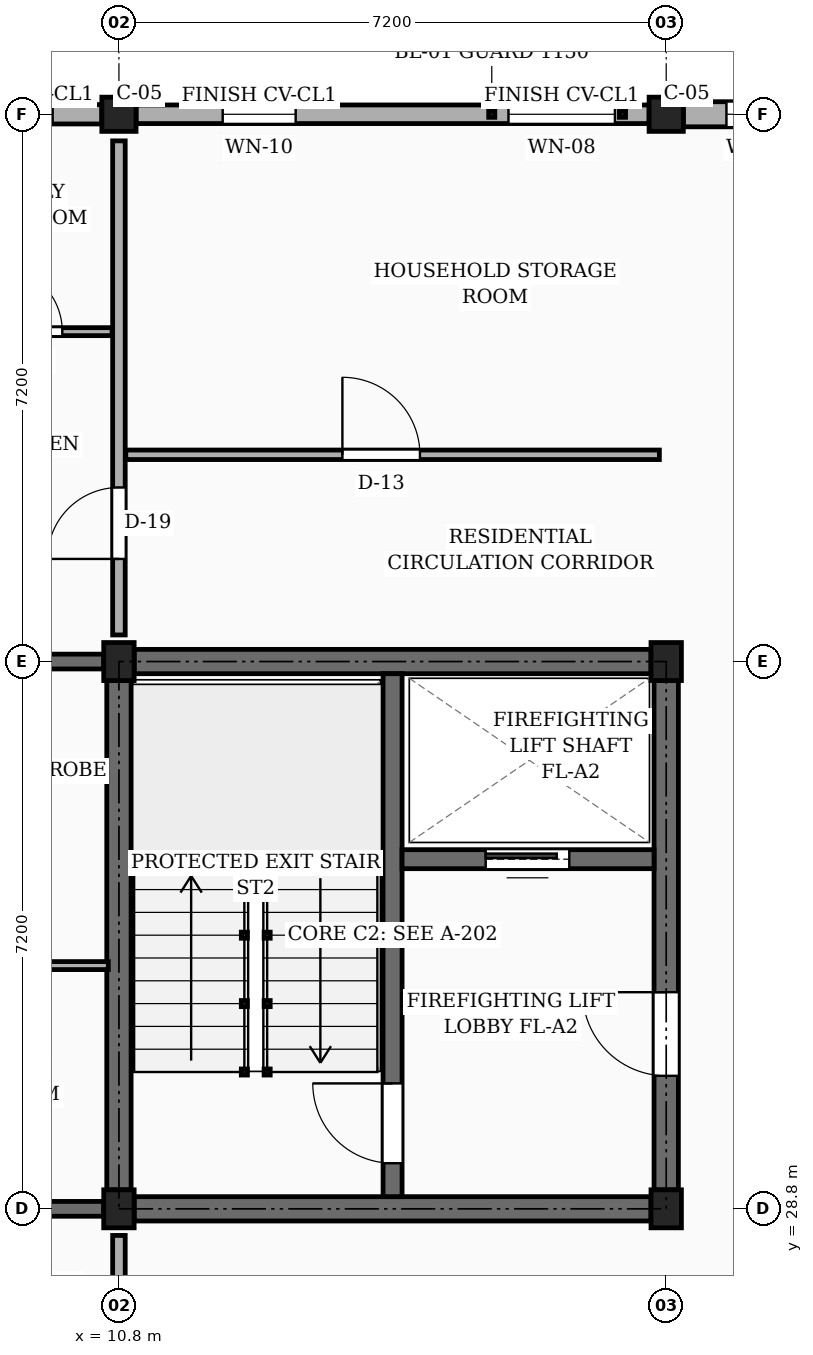
"""IFC4 building model, lengths in metres.
Left out: names, types, materials, properties, quantities, classifications, styles, units other than length and angle.
Written with IfcOpenShell. Run it as: python <this file> out.ifc"""

import sys

from ifc_helpers import new_model, si_unit, direction, frame, frame_2d, origin, origin_2d, place, context, subcontext, project, spatial, rectangle, extrude, element, fill, save


model = new_model("IFC4")
c1 = context("Model", 3, precision=1e-05, world=origin(), true_north=direction((0.0, 1.0)))
c2 = subcontext(c1, "Body", "Model", "MODEL_VIEW")
j1 = project(units=[si_unit("LENGTHUNIT", "METRE"), si_unit("PLANEANGLEUNIT", "RADIAN")], contexts=[c1])
p1 = place(None, origin())
s1 = spatial("IfcSite", under=j1, at=p1, CompositionType="ELEMENT")
p2 = place(p1, origin())
s2 = spatial("IfcBuilding", under=s1, at=p2, CompositionType="ELEMENT")
p3 = place(p2, frame((0.0, 0.0, 39.15)))
s3 = spatial("IfcBuildingStorey", under=s2, at=p3, CompositionType="ELEMENT", Elevation=39.15)
for number, where, z_axis, x_axis in (
    (1, (10.8, 28.8, 0.0), (0.0, 0.0, 1.0), (1.0, 0.0, 0.0)),
    (2, (10.8, 36.0, 0.0), (0.0, 0.0, 1.0), (1.0, 0.0, 0.0)),
):
    element("IfcColumn", number, at=place(p3, frame(where, z_axis=z_axis, x_axis=x_axis)), inside=s3, PredefinedType="COLUMN", context=c2, shape_type="SweptSolid", body=[
        extrude(rectangle(XDim=0.4, YDim=0.5, at=origin_2d()), origin(), (0.0, 0.0, 1.0), 3.15),
    ])
p4 = place(p3, frame((10.8, 43.2, 0.0), z_axis=(0.0, 0.0, 1.0), x_axis=(1.0, 0.0, 0.0)))
e3 = element("IfcColumn", 3, at=p4, inside=s3, PredefinedType="COLUMN", context=c2, shape_type="SweptSolid", body=[
    extrude(rectangle(XDim=0.45, YDim=0.45, at=origin_2d()), origin(), (0.0, 0.0, 1.0), 3.15),
])
for number, where, z_axis, x_axis in (
    (4, (18.0, 28.8, 0.0), (0.0, 0.0, 1.0), (1.0, 0.0, 0.0)),
    (5, (18.0, 36.0, 0.0), (0.0, 0.0, 1.0), (1.0, 0.0, 0.0)),
):
    element("IfcColumn", number, at=place(p3, frame(where, z_axis=z_axis, x_axis=x_axis)), inside=s3, PredefinedType="COLUMN", context=c2, shape_type="SweptSolid", body=[
        extrude(rectangle(XDim=0.4, YDim=0.5, at=origin_2d()), origin(), (0.0, 0.0, 1.0), 3.15),
    ])
p5 = place(p3, frame((18.0, 43.2, 0.0), z_axis=(0.0, 0.0, 1.0), x_axis=(1.0, 0.0, 0.0)))
e6 = element("IfcColumn", 6, at=p5, inside=s3, PredefinedType="COLUMN", context=c2, shape_type="SweptSolid", body=[
    extrude(rectangle(XDim=0.45, YDim=0.45, at=origin_2d()), origin(), (0.0, 0.0, 1.0), 3.15),
])
p6 = place(p3, frame((3.825, 28.8, 0.0), z_axis=(0.0, 0.0, 1.0), x_axis=(1.0, 0.0, 0.0)))
e7 = element("IfcWall", 7, at=p6, inside=s3, PredefinedType="SOLIDWALL", context=c2, shape_type="SweptSolid", body=[
    extrude(rectangle(XDim=6.775, YDim=0.195, at=frame_2d((3.388, 0.0))), origin(), (0.0, 0.0, 1.0), 2.17),
])
p7 = place(p6, frame((1.35, 0.0, 0.0)))
e8 = element("IfcOpeningElement", 8, at=p7, cuts=e7, PredefinedType="OPENING", context=c2, shape_type="SweptSolid", body=[
    extrude(rectangle(XDim=0.98, YDim=2.12, at=frame_2d((0.49, 1.06))), frame((0.0, 0.107, 0.0), z_axis=(0.0, -1.0, 0.0), x_axis=(1.0, 0.0, 0.0)), (0.0, 0.0, 1.0), 0.215),
])
p8 = place(p3, frame((3.825, 36.0, 0.0), z_axis=(0.0, 0.0, 1.0), x_axis=(1.0, 0.0, 0.0)))
e9 = element("IfcWall", 9, at=p8, inside=s3, PredefinedType="SOLIDWALL", context=c2, shape_type="SweptSolid", body=[
    extrude(rectangle(XDim=6.775, YDim=0.195, at=frame_2d((3.388, 0.0))), origin(), (0.0, 0.0, 1.0), 2.17),
])
p9 = place(p3, frame((24.975, 43.2, 0.0), z_axis=(0.0, 0.0, 1.0), x_axis=(-1.0, 0.0, 0.0)))
e10 = element("IfcWall", 10, at=p9, inside=s3, PredefinedType="SOLIDWALL", context=c2, shape_type="SweptSolid", body=[
    extrude(rectangle(XDim=6.75, YDim=0.33, at=frame_2d((3.375, 0.0))), origin(), (0.0, 0.0, 1.0), 2.44),
])
p10 = place(p9, frame((0.917, 0.0, 0.78)))
e11 = element("IfcOpeningElement", 11, at=p10, cuts=e10, PredefinedType="OPENING", context=c2, shape_type="SweptSolid", body=[
    extrude(rectangle(XDim=1.16, YDim=1.15, at=frame_2d((0.58, 0.575))), frame((0.0, 0.175, 0.0), z_axis=(0.0, -1.0, 0.0), x_axis=(1.0, 0.0, 0.0)), (0.0, 0.0, 1.0), 0.35),
])
p11 = place(p9, frame((3.205, 0.0, 0.78)))
e12 = element("IfcOpeningElement", 12, at=p11, cuts=e10, PredefinedType="OPENING", context=c2, shape_type="SweptSolid", body=[
    extrude(rectangle(XDim=1.32, YDim=1.15, at=frame_2d((0.66, 0.575))), frame((0.0, 0.175, 0.0), z_axis=(0.0, -1.0, 0.0), x_axis=(1.0, 0.0, 0.0)), (0.0, 0.0, 1.0), 0.35),
])
p12 = place(p9, frame((5.302, 0.0, 0.78)))
e13 = element("IfcOpeningElement", 13, at=p12, cuts=e10, PredefinedType="OPENING", context=c2, shape_type="SweptSolid", body=[
    extrude(rectangle(XDim=0.88, YDim=1.26, at=frame_2d((0.44, 0.63))), frame((0.0, 0.175, 0.0), z_axis=(0.0, -1.0, 0.0), x_axis=(1.0, 0.0, 0.0)), (0.0, 0.0, 1.0), 0.35),
])
p13 = place(p3, frame((17.775, 43.2, 0.0), z_axis=(0.0, 0.0, 1.0), x_axis=(-1.0, 0.0, 0.0)))
e14 = element("IfcWall", 14, at=p13, inside=s3, PredefinedType="SOLIDWALL", context=c2, shape_type="SweptSolid", body=[
    extrude(rectangle(XDim=6.75, YDim=0.245, at=frame_2d((3.375, 0.0))), origin(), (0.0, 0.0, 1.0), 2.44),
])
p14 = place(p13, frame((0.45, 0.0, 0.78)))
e15 = element("IfcOpeningElement", 15, at=p14, cuts=e14, PredefinedType="OPENING", context=c2, shape_type="SweptSolid", body=[
    extrude(rectangle(XDim=1.4, YDim=1.15, at=frame_2d((0.7, 0.575))), frame((0.0, 0.133, 0.0), z_axis=(0.0, -1.0, 0.0), x_axis=(1.0, 0.0, 0.0)), (0.0, 0.0, 1.0), 0.265),
])
p15 = place(p13, frame((4.65, 0.0, 0.78)))
e16 = element("IfcOpeningElement", 16, at=p15, cuts=e14, PredefinedType="OPENING", context=c2, shape_type="SweptSolid", body=[
    extrude(rectangle(XDim=0.96, YDim=1.26, at=frame_2d((0.48, 0.63))), frame((0.0, 0.133, 0.0), z_axis=(0.0, -1.0, 0.0), x_axis=(1.0, 0.0, 0.0)), (0.0, 0.0, 1.0), 0.265),
])
p16 = place(p3, frame((10.575, 43.2, 0.0), z_axis=(0.0, 0.0, 1.0), x_axis=(-1.0, 0.0, 0.0)))
e17 = element("IfcWall", 17, at=p16, inside=s3, PredefinedType="SOLIDWALL", context=c2, shape_type="SweptSolid", body=[
    extrude(rectangle(XDim=6.75, YDim=0.255, at=frame_2d((3.375, 0.0))), origin(), (0.0, 0.0, 1.0), 2.44),
])
p17 = place(p16, frame((0.647, 0.0, 0.78)))
e18 = element("IfcOpeningElement", 18, at=p17, cuts=e17, PredefinedType="OPENING", context=c2, shape_type="SweptSolid", body=[
    extrude(rectangle(XDim=0.96, YDim=1.26, at=frame_2d((0.48, 0.63))), frame((0.0, 0.137, 0.0), z_axis=(0.0, -1.0, 0.0), x_axis=(1.0, 0.0, 0.0)), (0.0, 0.0, 1.0), 0.275),
])
p18 = place(p16, frame((3.802, 0.0, 0.78)))
e19 = element("IfcOpeningElement", 19, at=p18, cuts=e17, PredefinedType="OPENING", context=c2, shape_type="SweptSolid", body=[
    extrude(rectangle(XDim=1.12, YDim=1.26, at=frame_2d((0.56, 0.63))), frame((0.0, 0.137, 0.0), z_axis=(0.0, -1.0, 0.0), x_axis=(1.0, 0.0, 0.0)), (0.0, 0.0, 1.0), 0.275),
])
p19 = place(p3, frame((10.8, 29.05, 0.0), z_axis=(0.0, 0.0, 1.0), x_axis=(0.0, 1.0, 0.0)))
e20 = element("IfcWall", 20, at=p19, inside=s3, PredefinedType="SHEAR", context=c2, shape_type="SweptSolid", body=[
    extrude(rectangle(XDim=6.7, YDim=0.32, at=frame_2d((3.35, 0.0))), origin(), (0.0, 0.0, 1.0), 2.87),
])
p20 = place(p3, frame((11.0, 36.0, 0.0), z_axis=(0.0, 0.0, 1.0), x_axis=(1.0, 0.0, 0.0)))
e21 = element("IfcWall", 21, at=p20, inside=s3, PredefinedType="SHEAR", context=c2, shape_type="SweptSolid", body=[
    extrude(rectangle(XDim=6.8, YDim=0.32, at=frame_2d((3.4, 0.0))), origin(), (0.0, 0.0, 1.0), 2.87),
])
p21 = place(p3, frame((18.0, 29.05, 0.0), z_axis=(0.0, 0.0, 1.0), x_axis=(0.0, 1.0, 0.0)))
e22 = element("IfcWall", 22, at=p21, inside=s3, PredefinedType="SHEAR", context=c2, shape_type="SweptSolid", body=[
    extrude(rectangle(XDim=6.7, YDim=0.32, at=frame_2d((3.35, 0.0))), origin(), (0.0, 0.0, 1.0), 2.87),
])
p22 = place(p21, frame((1.5, 0.0, 0.0)))
e23 = element("IfcOpeningElement", 23, at=p22, cuts=e22, PredefinedType="OPENING", context=c2, shape_type="SweptSolid", body=[
    extrude(rectangle(XDim=1.1, YDim=2.15, at=frame_2d((0.55, 1.075))), frame((0.0, 0.17, 0.0), z_axis=(0.0, -1.0, 0.0), x_axis=(1.0, 0.0, 0.0)), (0.0, 0.0, 1.0), 0.34),
])
p23 = place(p3, frame((11.0, 28.8, 0.0), z_axis=(0.0, 0.0, 1.0), x_axis=(1.0, 0.0, 0.0)))
e24 = element("IfcWall", 24, at=p23, inside=s3, PredefinedType="SHEAR", context=c2, shape_type="SweptSolid", body=[
    extrude(rectangle(XDim=6.8, YDim=0.32, at=frame_2d((3.4, 0.0))), origin(), (0.0, 0.0, 1.0), 2.87),
])
p24 = place(p3, frame((14.4, 28.96, 0.0), z_axis=(0.0, 0.0, 1.0), x_axis=(0.0, 1.0, 0.0)))
e25 = element("IfcWall", 25, at=p24, inside=s3, PredefinedType="SHEAR", context=c2, shape_type="SweptSolid", body=[
    extrude(rectangle(XDim=6.88, YDim=0.25, at=frame_2d((3.44, 0.0))), origin(), (0.0, 0.0, 1.0), 2.87),
])
p25 = place(p24, frame((0.44, 0.0, 0.0)))
e26 = element("IfcOpeningElement", 26, at=p25, cuts=e25, PredefinedType="OPENING", context=c2, shape_type="SweptSolid", body=[
    extrude(rectangle(XDim=1.05, YDim=2.15, at=frame_2d((0.525, 1.075))), frame((0.0, 0.135, 0.0), z_axis=(0.0, -1.0, 0.0), x_axis=(1.0, 0.0, 0.0)), (0.0, 0.0, 1.0), 0.27),
])
p26 = place(p3, frame((14.525, 33.4, 0.0), z_axis=(0.0, 0.0, 1.0), x_axis=(1.0, 0.0, 0.0)))
e27 = element("IfcWall", 27, at=p26, inside=s3, PredefinedType="SHEAR", context=c2, shape_type="SweptSolid", body=[
    extrude(rectangle(XDim=3.315, YDim=0.25, at=frame_2d((1.658, 0.0))), origin(), (0.0, 0.0, 1.0), 2.87),
])
p27 = place(p26, frame((1.1, 0.0, 0.0)))
e28 = element("IfcOpeningElement", 28, at=p27, cuts=e27, PredefinedType="OPENING", context=c2, shape_type="SweptSolid", body=[
    extrude(rectangle(XDim=1.1, YDim=2.2, at=frame_2d((0.55, 1.1))), frame((0.0, 0.135, 0.0), z_axis=(0.0, -1.0, 0.0), x_axis=(1.0, 0.0, 0.0)), (0.0, 0.0, 1.0), 0.27),
])
p28 = place(p3, frame((10.8, 21.95, 0.0), z_axis=(0.0, 0.0, 1.0), x_axis=(0.0, 1.0, 0.0)))
e29 = element("IfcWall", 29, at=p28, inside=s3, PredefinedType="PARTITIONING", context=c2, shape_type="SweptSolid", body=[
    extrude(rectangle(XDim=6.5, YDim=0.165, at=frame_2d((3.25, 0.0))), origin(), (0.0, 0.0, 1.0), 2.305),
])
p29 = place(p28, frame((1.0, 0.0, 0.0)))
e30 = element("IfcOpeningElement", 30, at=p29, cuts=e29, PredefinedType="OPENING", context=c2, shape_type="SweptSolid", body=[
    extrude(rectangle(XDim=1.0, YDim=2.15, at=frame_2d((0.5, 1.075))), frame((0.0, 0.093, 0.0), z_axis=(0.0, -1.0, 0.0), x_axis=(1.0, 0.0, 0.0)), (0.0, 0.0, 1.0), 0.185),
])
p30 = place(p3, frame((10.8, 36.35, 0.0), z_axis=(0.0, 0.0, 1.0), x_axis=(0.0, 1.0, 0.0)))
e31 = element("IfcWall", 31, at=p30, inside=s3, PredefinedType="PARTITIONING", context=c2, shape_type="SweptSolid", body=[
    extrude(rectangle(XDim=6.5, YDim=0.165, at=frame_2d((3.25, 0.0))), origin(), (0.0, 0.0, 1.0), 2.305),
])
p31 = place(p30, frame((1.0, 0.0, 0.0)))
e32 = element("IfcOpeningElement", 32, at=p31, cuts=e31, PredefinedType="OPENING", context=c2, shape_type="SweptSolid", body=[
    extrude(rectangle(XDim=0.94, YDim=2.12, at=frame_2d((0.47, 1.06))), frame((0.0, 0.093, 0.0), z_axis=(0.0, -1.0, 0.0), x_axis=(1.0, 0.0, 0.0)), (0.0, 0.0, 1.0), 0.185),
])
p32 = place(p3, frame((7.27, 32.0, 0.0), z_axis=(0.0, 0.0, 1.0), x_axis=(1.0, 0.0, 0.0)))
e33 = element("IfcWall", 33, at=p32, inside=s3, PredefinedType="PARTITIONING", context=c2, shape_type="SweptSolid", body=[
    extrude(rectangle(XDim=3.39, YDim=0.105, at=frame_2d((1.695, 0.0))), origin(), (0.0, 0.0, 1.0), 2.305),
])
p33 = place(p3, frame((10.89, 38.72, 0.0), z_axis=(0.0, 0.0, 1.0), x_axis=(1.0, 0.0, 0.0)))
e34 = element("IfcWall", 34, at=p33, inside=s3, PredefinedType="PARTITIONING", context=c2, shape_type="SweptSolid", body=[
    extrude(rectangle(XDim=7.02, YDim=0.125, at=frame_2d((3.51, 0.0))), origin(), (0.0, 0.0, 1.0), 2.305),
])
p34 = place(p33, frame((2.85, 0.0, 0.0)))
e35 = element("IfcOpeningElement", 35, at=p34, cuts=e34, PredefinedType="OPENING", context=c2, shape_type="SweptSolid", body=[
    extrude(rectangle(XDim=1.02, YDim=2.15, at=frame_2d((0.51, 1.075))), frame((0.0, 0.073, 0.0), z_axis=(0.0, -1.0, 0.0), x_axis=(1.0, 0.0, 0.0)), (0.0, 0.0, 1.0), 0.145),
])
p35 = place(p3, frame((8.53, 40.34, 0.0), z_axis=(0.0, 0.0, 1.0), x_axis=(1.0, 0.0, 0.0)))
e36 = element("IfcWall", 36, at=p35, inside=s3, PredefinedType="PARTITIONING", context=c2, shape_type="SweptSolid", body=[
    extrude(rectangle(XDim=2.18, YDim=0.105, at=frame_2d((1.09, 0.0))), origin(), (0.0, 0.0, 1.0), 2.305),
])
p36 = place(p35, frame((0.655, 0.0, 0.0)))
e37 = element("IfcOpeningElement", 37, at=p36, cuts=e36, PredefinedType="OPENING", context=c2, shape_type="SweptSolid", body=[
    extrude(rectangle(XDim=0.87, YDim=2.05, at=frame_2d((0.435, 1.025))), frame((0.0, 0.062, 0.0), z_axis=(0.0, -1.0, 0.0), x_axis=(1.0, 0.0, 0.0)), (0.0, 0.0, 1.0), 0.125),
])
p37 = place(p12, origin())
e38 = element("IfcWindow", 38, at=p37, inside=s3, PartitioningType="SINGLE_PANEL", PredefinedType="WINDOW", context=c2, shape_type="SweptSolid", body=[
    extrude(rectangle(XDim=0.88, YDim=1.26, at=frame_2d((0.44, 0.63))), frame((0.0, 0.03, 0.0), z_axis=(0.0, -1.0, 0.0), x_axis=(1.0, 0.0, 0.0)), (0.0, 0.0, 1.0), 0.06),
])
fill(e13, e38)
p38 = place(p14, origin())
e39 = element("IfcWindow", 39, at=p38, inside=s3, PartitioningType="SINGLE_PANEL", PredefinedType="WINDOW", context=c2, shape_type="SweptSolid", body=[
    extrude(rectangle(XDim=1.4, YDim=1.15, at=frame_2d((0.7, 0.575))), frame((0.0, 0.03, 0.0), z_axis=(0.0, -1.0, 0.0), x_axis=(1.0, 0.0, 0.0)), (0.0, 0.0, 1.0), 0.06),
])
fill(e15, e39)
p39 = place(p15, origin())
e40 = element("IfcWindow", 40, at=p39, inside=s3, PartitioningType="SINGLE_PANEL", PredefinedType="WINDOW", context=c2, shape_type="SweptSolid", body=[
    extrude(rectangle(XDim=0.96, YDim=1.26, at=frame_2d((0.48, 0.63))), frame((0.0, 0.03, 0.0), z_axis=(0.0, -1.0, 0.0), x_axis=(1.0, 0.0, 0.0)), (0.0, 0.0, 1.0), 0.06),
])
fill(e16, e40)
p40 = place(p17, origin())
e41 = element("IfcWindow", 41, at=p40, inside=s3, PartitioningType="SINGLE_PANEL", PredefinedType="WINDOW", context=c2, shape_type="SweptSolid", body=[
    extrude(rectangle(XDim=0.96, YDim=1.26, at=frame_2d((0.48, 0.63))), frame((0.0, 0.03, 0.0), z_axis=(0.0, -1.0, 0.0), x_axis=(1.0, 0.0, 0.0)), (0.0, 0.0, 1.0), 0.06),
])
fill(e18, e41)
p41 = place(p22, frame((1.1, 0.0, 0.0), z_axis=(0.0, 0.0, 1.0), x_axis=(-1.0, 0.0, 0.0)))
e42 = element("IfcDoor", 42, at=p41, inside=s3, OperationType="SINGLE_SWING_RIGHT", PredefinedType="DOOR", context=c2, shape_type="SweptSolid", body=[
    extrude(rectangle(XDim=1.1, YDim=2.15, at=frame_2d((0.55, 1.075))), frame((0.0, 0.025, 0.0), z_axis=(0.0, -1.0, 0.0), x_axis=(1.0, 0.0, 0.0)), (0.0, 0.0, 1.0), 0.05),
])
fill(e23, e42)
p42 = place(p25, origin())
e43 = element("IfcDoor", 43, at=p42, inside=s3, OperationType="SINGLE_SWING_RIGHT", PredefinedType="DOOR", context=c2, shape_type="SweptSolid", body=[
    extrude(rectangle(XDim=1.05, YDim=2.15, at=frame_2d((0.525, 1.075))), frame((0.0, 0.025, 0.0), z_axis=(0.0, -1.0, 0.0), x_axis=(1.0, 0.0, 0.0)), (0.0, 0.0, 1.0), 0.05),
])
fill(e26, e43)
p43 = place(p27, origin())
e44 = element("IfcDoor", 44, at=p43, inside=s3, OperationType="SLIDING_TO_LEFT", PredefinedType="DOOR", context=c2, shape_type="SweptSolid", body=[
    extrude(rectangle(XDim=1.1, YDim=2.2, at=frame_2d((0.55, 1.1))), frame((0.0, 0.025, 0.0), z_axis=(0.0, -1.0, 0.0), x_axis=(1.0, 0.0, 0.0)), (0.0, 0.0, 1.0), 0.05),
])
fill(e28, e44)
p44 = place(p31, origin())
e45 = element("IfcDoor", 45, at=p44, inside=s3, OperationType="SINGLE_SWING_LEFT", PredefinedType="DOOR", context=c2, shape_type="SweptSolid", body=[
    extrude(rectangle(XDim=0.94, YDim=2.12, at=frame_2d((0.47, 1.06))), frame((0.0, 0.025, 0.0), z_axis=(0.0, -1.0, 0.0), x_axis=(1.0, 0.0, 0.0)), (0.0, 0.0, 1.0), 0.05),
])
fill(e32, e45)
p45 = place(p34, origin())
e46 = element("IfcDoor", 46, at=p45, inside=s3, OperationType="SINGLE_SWING_LEFT", PredefinedType="DOOR", context=c2, shape_type="SweptSolid", body=[
    extrude(rectangle(XDim=1.02, YDim=2.15, at=frame_2d((0.51, 1.075))), frame((0.0, 0.025, 0.0), z_axis=(0.0, -1.0, 0.0), x_axis=(1.0, 0.0, 0.0)), (0.0, 0.0, 1.0), 0.05),
])
fill(e35, e46)
p46 = place(p36, origin())
e47 = element("IfcDoor", 47, at=p46, inside=s3, OperationType="SINGLE_SWING_LEFT", PredefinedType="DOOR", context=c2, shape_type="SweptSolid", body=[
    extrude(rectangle(XDim=0.87, YDim=2.05, at=frame_2d((0.435, 1.025))), frame((0.0, 0.025, 0.0), z_axis=(0.0, -1.0, 0.0), x_axis=(1.0, 0.0, 0.0)), (0.0, 0.0, 1.0), 0.05),
])
fill(e37, e47)
save(model, sys.argv[1])
